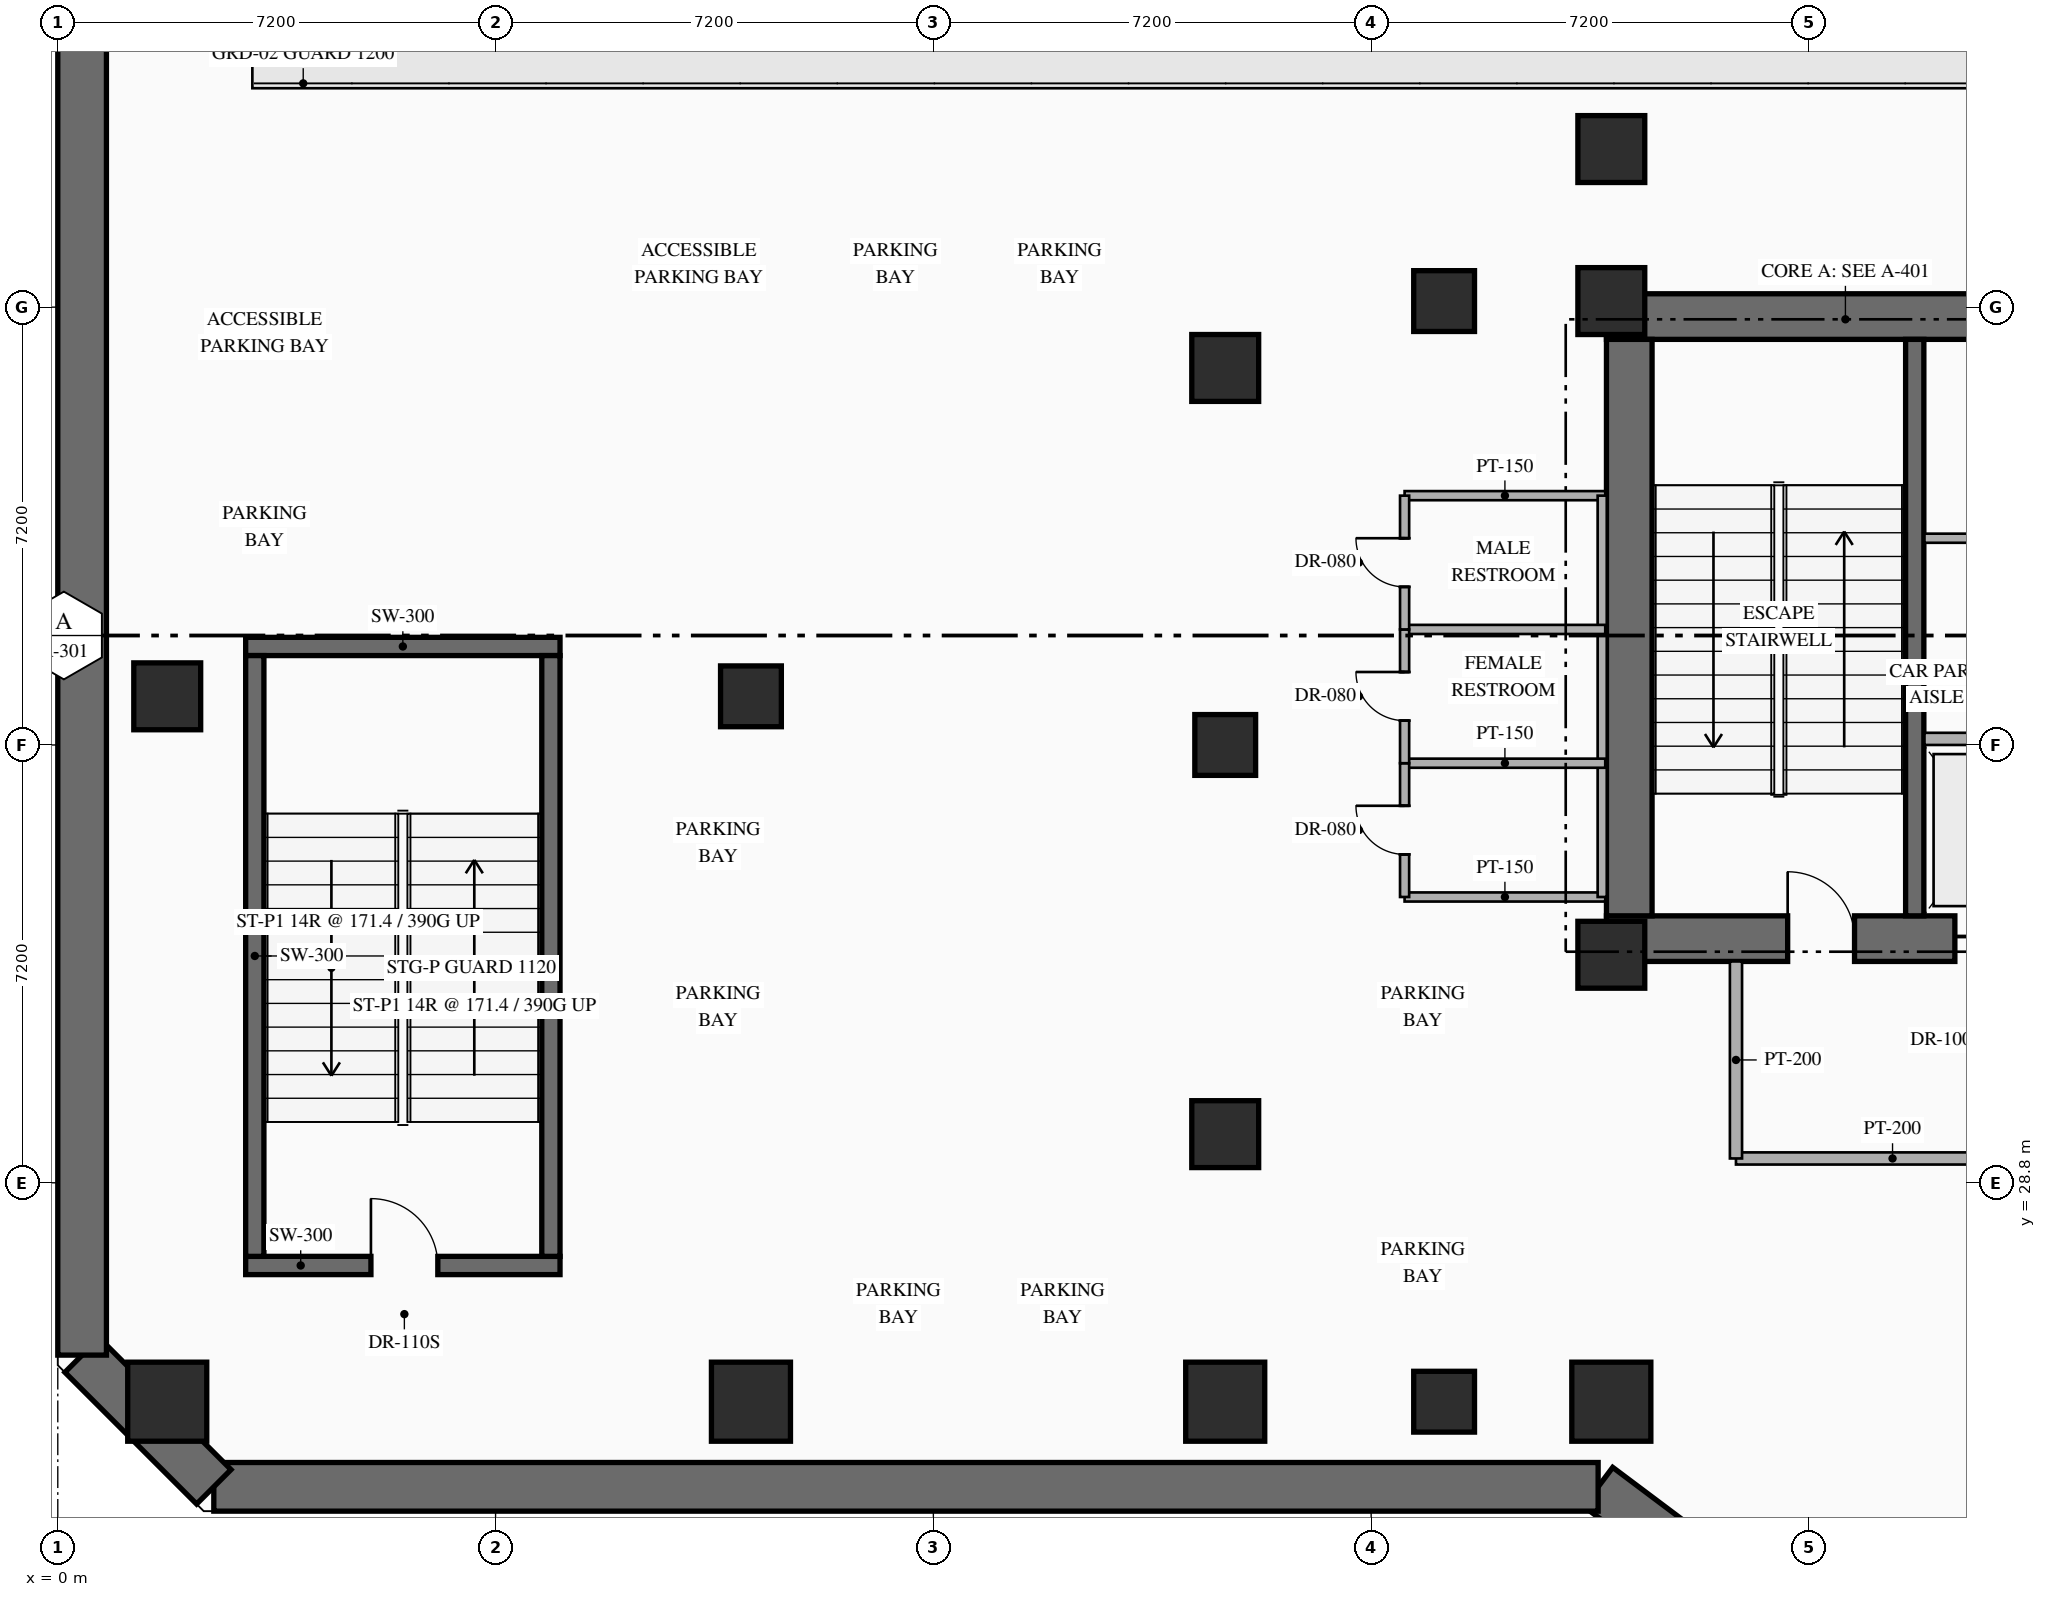
"""IFC4 building model, lengths in metres.
Left out: names, types, materials, properties, quantities, classifications, styles, units other than length and angle.
Written with IfcOpenShell. Run it as: python <this file> out.ifc"""

import sys

from ifc_helpers import new_model, si_unit, direction, frame, frame_2d, origin, origin_2d, place, context, subcontext, project, spatial, rectangle, hollow_rectangle, extrude, element, fill, save


model = new_model("IFC4")
c1 = context("Model", 3, precision=1e-05, world=origin(), true_north=direction((0.0, 1.0)))
c2 = subcontext(c1, "Body", "Model", "MODEL_VIEW")
j1 = project(units=[si_unit("LENGTHUNIT", "METRE"), si_unit("PLANEANGLEUNIT", "RADIAN")], contexts=[c1])
p1 = place(None, origin())
s1 = spatial("IfcSite", under=j1, at=p1, CompositionType="ELEMENT")
p2 = place(p1, origin())
s2 = spatial("IfcBuilding", under=s1, at=p2, CompositionType="ELEMENT")
p3 = place(p2, frame((0.0, 0.0, -9.6)))
s3 = spatial("IfcBuildingStorey", under=s2, at=p3, CompositionType="ELEMENT", Elevation=-9.6)
p4 = place(p3, frame((25.47, 32.815, 0.0), z_axis=(0.0, 0.0, 1.0), x_axis=(1.0, 0.0, 0.0)))
e1 = element("IfcWall", 1, at=p4, inside=s3, PredefinedType="SHEAR", context=c2, shape_type="SweptSolid", body=[
    extrude(rectangle(XDim=8.08, YDim=0.75, at=frame_2d((4.04, 0.0))), origin(), (0.0, 0.0, 1.0), 4.8),
])
p5 = place(p4, frame((2.98, 0.0, 0.0)))
e2 = element("IfcOpeningElement", 2, at=p5, cuts=e1, PredefinedType="OPENING", context=c2, shape_type="SweptSolid", body=[
    extrude(rectangle(XDim=1.1, YDim=2.2, at=frame_2d((0.55, 1.1))), frame((0.0, 0.385, 0.0), z_axis=(0.0, -1.0, 0.0), x_axis=(1.0, 0.0, 0.0)), (0.0, 0.0, 1.0), 0.77),
])
p6 = place(p4, frame((5.73, 0.0, 0.0)))
e3 = element("IfcOpeningElement", 3, at=p6, cuts=e1, PredefinedType="OPENING", context=c2, shape_type="SweptSolid", body=[
    extrude(rectangle(XDim=1.1, YDim=2.15, at=frame_2d((0.55, 1.075))), frame((0.0, 0.385, 0.0), z_axis=(0.0, -1.0, 0.0), x_axis=(1.0, 0.0, 0.0)), (0.0, 0.0, 1.0), 0.77),
])
p7 = place(p3, frame((25.47, 43.045, 0.0), z_axis=(0.0, 0.0, 1.0), x_axis=(1.0, 0.0, 0.0)))
e4 = element("IfcWall", 4, at=p7, inside=s3, PredefinedType="SHEAR", context=c2, shape_type="SweptSolid", body=[
    extrude(rectangle(XDim=8.08, YDim=0.75, at=frame_2d((4.04, 0.0))), origin(), (0.0, 0.0, 1.0), 4.8),
])
p8 = place(p3, frame((25.845, 33.19, 0.0), z_axis=(0.0, 0.0, 1.0), x_axis=(0.0, 1.0, 0.0)))
e5 = element("IfcWall", 5, at=p8, inside=s3, PredefinedType="SHEAR", context=c2, shape_type="SweptSolid", body=[
    extrude(rectangle(XDim=9.48, YDim=0.75, at=frame_2d((4.74, 0.0))), origin(), (0.0, 0.0, 1.0), 4.8),
])
p9 = place(p3, frame((30.54, 33.19, 0.0), z_axis=(0.0, 0.0, 1.0), x_axis=(0.0, 1.0, 0.0)))
e6 = element("IfcWall", 6, at=p9, inside=s3, PredefinedType="SHEAR", context=c2, shape_type="SweptSolid", body=[
    extrude(rectangle(XDim=9.48, YDim=0.3, at=frame_2d((4.74, 0.0))), origin(), (0.0, 0.0, 1.0), 4.8),
])
p10 = place(p3, frame((3.09, 27.44, 0.0), z_axis=(0.0, 0.0, 1.0), x_axis=(1.0, 0.0, 0.0)))
e7 = element("IfcWall", 7, at=p10, inside=s3, PredefinedType="SHEAR", context=c2, shape_type="SweptSolid", body=[
    extrude(rectangle(XDim=5.17, YDim=0.3, at=frame_2d((2.585, 0.0))), origin(), (0.0, 0.0, 1.0), 4.8),
])
p11 = place(p10, frame((2.06, 0.0, 0.0)))
e8 = element("IfcOpeningElement", 8, at=p11, cuts=e7, PredefinedType="OPENING", context=c2, shape_type="SweptSolid", body=[
    extrude(rectangle(XDim=1.1, YDim=2.2, at=frame_2d((0.55, 1.1))), frame((0.0, 0.16, 0.0), z_axis=(0.0, -1.0, 0.0), x_axis=(1.0, 0.0, 0.0)), (0.0, 0.0, 1.0), 0.32),
])
p12 = place(p3, frame((3.09, 37.62, 0.0), z_axis=(0.0, 0.0, 1.0), x_axis=(1.0, 0.0, 0.0)))
e9 = element("IfcWall", 9, at=p12, inside=s3, PredefinedType="SHEAR", context=c2, shape_type="SweptSolid", body=[
    extrude(rectangle(XDim=5.17, YDim=0.3, at=frame_2d((2.585, 0.0))), origin(), (0.0, 0.0, 1.0), 4.8),
])
for number, where, z_axis, x_axis in (
    (10, (3.24, 27.59, 0.0), (0.0, 0.0, 1.0), (0.0, 1.0, 0.0)),
    (11, (8.11, 27.59, 0.0), (0.0, 0.0, 1.0), (0.0, 1.0, 0.0)),
):
    element("IfcWall", number, at=place(p3, frame(where, z_axis=z_axis, x_axis=x_axis)), inside=s3, PredefinedType="SHEAR", context=c2, shape_type="SweptSolid", body=[
        extrude(rectangle(XDim=9.88, YDim=0.3, at=frame_2d((4.94, 0.0))), origin(), (0.0, 0.0, 1.0), 4.8),
    ])
p13 = place(p3, frame((29.512, 20.666, 0.0), z_axis=(0.0, 0.0, 1.0), x_axis=(-0.800016825418, 0.599977565455, 0.0)))
e12 = element("IfcWall", 12, at=p13, inside=s3, PredefinedType="SHEAR", context=c2, shape_type="SweptSolid", body=[
    extrude(rectangle(XDim=5.224, YDim=0.8, at=frame_2d((2.612, 0.0))), origin(), (0.0, 0.0, 1.0), 4.5),
])
p14 = place(p3, frame((25.333, 23.8, 0.0), z_axis=(0.0, 0.0, 1.0), x_axis=(-1.0, 0.0, 0.0)))
e13 = element("IfcWall", 13, at=p14, inside=s3, PredefinedType="SHEAR", context=c2, shape_type="SweptSolid", body=[
    extrude(rectangle(XDim=22.767, YDim=0.8, at=frame_2d((11.384, 0.0))), origin(), (0.0, 0.0, 1.0), 4.5),
])
p15 = place(p3, frame((2.566, 23.8, 0.0), z_axis=(0.0, 0.0, 1.0), x_axis=(-0.707106781187, 0.707106781187, 0.0)))
e14 = element("IfcWall", 14, at=p15, inside=s3, PredefinedType="SHEAR", context=c2, shape_type="SweptSolid", body=[
    extrude(rectangle(XDim=3.063, YDim=0.8, at=frame_2d((1.532, 0.0))), origin(), (0.0, 0.0, 1.0), 4.5),
])
p16 = place(p3, frame((0.4, 25.966, 0.0), z_axis=(0.0, 0.0, 1.0), x_axis=(0.0, 1.0, 0.0)))
e15 = element("IfcWall", 15, at=p16, inside=s3, PredefinedType="SHEAR", context=c2, shape_type="SweptSolid", body=[
    extrude(rectangle(XDim=23.068, YDim=0.8, at=frame_2d((11.534, 0.0))), origin(), (0.0, 0.0, 1.0), 4.5),
])
for number, where, z_axis, x_axis in (
    (16, (25.55, 32.55, 0.0), (0.0, 0.0, 1.0), (1.0, 0.0, 0.0)),
    (17, (25.55, 43.3, 0.0), (0.0, 0.0, 1.0), (1.0, 0.0, 0.0)),
):
    element("IfcColumn", number, at=place(p3, frame(where, z_axis=z_axis, x_axis=x_axis)), inside=s3, PredefinedType="COLUMN", context=c2, shape_type="SweptSolid", body=[
        extrude(rectangle(XDim=1.1, YDim=1.1, at=origin_2d()), origin(), (0.0, 0.0, 1.0), 4.8),
    ])
p17 = place(p3, frame((25.55, 25.2, 0.0), z_axis=(0.0, 0.0, 1.0), x_axis=(1.0, 0.0, 0.0)))
e18 = element("IfcColumn", 18, at=p17, inside=s3, PredefinedType="COLUMN", context=c2, shape_type="SweptSolid", body=[
    extrude(rectangle(XDim=1.3, YDim=1.3, at=origin_2d()), origin(), (0.0, 0.0, 1.0), 4.8),
])
p18 = place(p3, frame((25.55, 45.8, 0.0), z_axis=(0.0, 0.0, 1.0), x_axis=(1.0, 0.0, 0.0)))
e19 = element("IfcColumn", 19, at=p18, inside=s3, PredefinedType="COLUMN", context=c2, shape_type="SweptSolid", body=[
    extrude(hollow_rectangle(XDim=1.1, YDim=1.1, WallThickness=0.04, at=origin_2d()), origin(), (0.0, 0.0, 1.0), 4.8),
])
p19 = place(p3, frame((1.8, 25.2, 0.0), z_axis=(0.0, 0.0, 1.0), x_axis=(1.0, 0.0, 0.0)))
e20 = element("IfcColumn", 20, at=p19, inside=s3, PredefinedType="COLUMN", context=c2, shape_type="SweptSolid", body=[
    extrude(rectangle(XDim=1.3, YDim=1.3, at=origin_2d()), origin(), (0.0, 0.0, 1.0), 4.8),
])
p20 = place(p3, frame((1.8, 36.8, 0.0), z_axis=(0.0, 0.0, 1.0), x_axis=(1.0, 0.0, 0.0)))
e21 = element("IfcColumn", 21, at=p20, inside=s3, PredefinedType="COLUMN", context=c2, shape_type="SweptSolid", body=[
    extrude(hollow_rectangle(XDim=1.1, YDim=1.1, WallThickness=0.04, at=origin_2d()), origin(), (0.0, 0.0, 1.0), 4.8),
])
for number, where, z_axis, x_axis in (
    (22, (11.4, 25.2, 0.0), (0.0, 0.0, 1.0), (1.0, 0.0, 0.0)),
    (23, (19.2, 25.2, 0.0), (0.0, 0.0, 1.0), (1.0, 0.0, 0.0)),
):
    element("IfcColumn", number, at=place(p3, frame(where, z_axis=z_axis, x_axis=x_axis)), inside=s3, PredefinedType="COLUMN", context=c2, shape_type="SweptSolid", body=[
        extrude(rectangle(XDim=1.3, YDim=1.3, at=origin_2d()), origin(), (0.0, 0.0, 1.0), 4.8),
    ])
for number, where, z_axis, x_axis in (
    (24, (19.2, 29.6, 0.0), (0.0, 0.0, 1.0), (1.0, 0.0, 0.0)),
    (25, (19.2, 42.2, 0.0), (0.0, 0.0, 1.0), (1.0, 0.0, 0.0)),
):
    element("IfcColumn", number, at=place(p3, frame(where, z_axis=z_axis, x_axis=x_axis)), inside=s3, PredefinedType="COLUMN", context=c2, shape_type="SweptSolid", body=[
        extrude(hollow_rectangle(XDim=1.1, YDim=1.1, WallThickness=0.04, at=origin_2d()), origin(), (0.0, 0.0, 1.0), 4.8),
    ])
for number, where, z_axis, x_axis in (
    (26, (22.8, 25.2, 0.0), (0.0, 0.0, 1.0), (1.0, 0.0, 0.0)),
    (27, (22.8, 43.3, 0.0), (0.0, 0.0, 1.0), (1.0, 0.0, 0.0)),
    (28, (11.4, 36.8, 0.0), (0.0, 0.0, 1.0), (1.0, 0.0, 0.0)),
    (29, (19.2, 36.0, 0.0), (0.0, 0.0, 1.0), (1.0, 0.0, 0.0)),
):
    element("IfcColumn", number, at=place(p3, frame(where, z_axis=z_axis, x_axis=x_axis)), inside=s3, PredefinedType="COLUMN", context=c2, shape_type="SweptSolid", body=[
        extrude(hollow_rectangle(XDim=1.0, YDim=1.0, WallThickness=0.038, at=origin_2d()), origin(), (0.0, 0.0, 1.0), 4.8),
    ])
p21 = place(p3, frame((30.7, 36.1, 0.0), z_axis=(0.0, 0.0, 1.0), x_axis=(1.0, 0.0, 0.0)))
e30 = element("IfcWall", 30, at=p21, inside=s3, PredefinedType="STANDARD", context=c2, shape_type="SweptSolid", body=[
    extrude(rectangle(XDim=2.1, YDim=0.2, at=frame_2d((1.05, 0.0))), origin(), (0.0, 0.0, 1.0), 4.5),
])
p22 = place(p3, frame((30.7, 39.4, 0.0), z_axis=(0.0, 0.0, 1.0), x_axis=(1.0, 0.0, 0.0)))
e31 = element("IfcWall", 31, at=p22, inside=s3, PredefinedType="PARTITIONING", context=c2, shape_type="SweptSolid", body=[
    extrude(rectangle(XDim=2.1, YDim=0.15, at=frame_2d((1.05, 0.0))), origin(), (0.0, 0.0, 1.0), 4.5),
])
p23 = place(p3, frame((27.6, 29.2, 0.0), z_axis=(0.0, 0.0, 1.0), x_axis=(1.0, 0.0, 0.0)))
e32 = element("IfcWall", 32, at=p23, inside=s3, PredefinedType="STANDARD", context=c2, shape_type="SweptSolid", body=[
    extrude(rectangle(XDim=5.15, YDim=0.2, at=frame_2d((2.575, 0.0))), origin(), (0.0, 0.0, 1.0), 4.5),
])
p24 = place(p3, frame((27.6, 29.2, 0.0), z_axis=(0.0, 0.0, 1.0), x_axis=(0.0, 1.0, 0.0)))
e33 = element("IfcWall", 33, at=p24, inside=s3, PredefinedType="STANDARD", context=c2, shape_type="SweptSolid", body=[
    extrude(rectangle(XDim=3.24, YDim=0.2, at=frame_2d((1.62, 0.0))), origin(), (0.0, 0.0, 1.0), 4.5),
])
for number, where, z_axis, x_axis in (
    (34, (22.15, 33.5, 0.0), (0.0, 0.0, 1.0), (1.0, 0.0, 0.0)),
    (35, (22.15, 40.1, 0.0), (0.0, 0.0, 1.0), (1.0, 0.0, 0.0)),
):
    element("IfcWall", number, at=place(p3, frame(where, z_axis=z_axis, x_axis=x_axis)), inside=s3, PredefinedType="PARTITIONING", context=c2, shape_type="SweptSolid", body=[
        extrude(rectangle(XDim=3.3, YDim=0.15, at=frame_2d((1.65, 0.0))), origin(), (0.0, 0.0, 1.0), 4.5),
    ])
p25 = place(p3, frame((25.4, 33.5, 0.0), z_axis=(0.0, 0.0, 1.0), x_axis=(0.0, 1.0, 0.0)))
e36 = element("IfcWall", 36, at=p25, inside=s3, PredefinedType="PARTITIONING", context=c2, shape_type="SweptSolid", body=[
    extrude(rectangle(XDim=6.6, YDim=0.15, at=frame_2d((3.3, 0.0))), origin(), (0.0, 0.0, 1.0), 4.5),
])
for number, where, z_axis, x_axis in (
    (37, (22.15, 35.7, 0.0), (0.0, 0.0, 1.0), (1.0, 0.0, 0.0)),
    (38, (22.15, 37.9, 0.0), (0.0, 0.0, 1.0), (1.0, 0.0, 0.0)),
):
    element("IfcWall", number, at=place(p3, frame(where, z_axis=z_axis, x_axis=x_axis)), inside=s3, PredefinedType="PARTITIONING", context=c2, shape_type="SweptSolid", body=[
        extrude(rectangle(XDim=3.3, YDim=0.15, at=frame_2d((1.65, 0.0))), origin(), (0.0, 0.0, 1.0), 4.5),
    ])
p26 = place(p3, frame((22.15, 33.5, 0.0), z_axis=(0.0, 0.0, 1.0), x_axis=(0.0, 1.0, 0.0)))
e39 = element("IfcWall", 39, at=p26, inside=s3, PredefinedType="PARTITIONING", context=c2, shape_type="SweptSolid", body=[
    extrude(rectangle(XDim=2.2, YDim=0.15, at=frame_2d((1.1, 0.0))), origin(), (0.0, 0.0, 1.0), 4.5),
])
p27 = place(p26, frame((0.7, 0.0, 0.0)))
e40 = element("IfcOpeningElement", 40, at=p27, cuts=e39, PredefinedType="OPENING", context=c2, shape_type="SweptSolid", body=[
    extrude(rectangle(XDim=0.8, YDim=2.06, at=frame_2d((0.4, 1.03))), frame((0.0, 0.085, 0.0), z_axis=(0.0, -1.0, 0.0), x_axis=(1.0, 0.0, 0.0)), (0.0, 0.0, 1.0), 0.17),
])
p28 = place(p3, frame((22.15, 35.7, 0.0), z_axis=(0.0, 0.0, 1.0), x_axis=(0.0, 1.0, 0.0)))
e41 = element("IfcWall", 41, at=p28, inside=s3, PredefinedType="PARTITIONING", context=c2, shape_type="SweptSolid", body=[
    extrude(rectangle(XDim=2.2, YDim=0.15, at=frame_2d((1.1, 0.0))), origin(), (0.0, 0.0, 1.0), 4.5),
])
p29 = place(p28, frame((0.7, 0.0, 0.0)))
e42 = element("IfcOpeningElement", 42, at=p29, cuts=e41, PredefinedType="OPENING", context=c2, shape_type="SweptSolid", body=[
    extrude(rectangle(XDim=0.8, YDim=2.06, at=frame_2d((0.4, 1.03))), frame((0.0, 0.085, 0.0), z_axis=(0.0, -1.0, 0.0), x_axis=(1.0, 0.0, 0.0)), (0.0, 0.0, 1.0), 0.17),
])
p30 = place(p3, frame((22.15, 37.9, 0.0), z_axis=(0.0, 0.0, 1.0), x_axis=(0.0, 1.0, 0.0)))
e43 = element("IfcWall", 43, at=p30, inside=s3, PredefinedType="PARTITIONING", context=c2, shape_type="SweptSolid", body=[
    extrude(rectangle(XDim=2.2, YDim=0.15, at=frame_2d((1.1, 0.0))), origin(), (0.0, 0.0, 1.0), 4.5),
])
p31 = place(p30, frame((0.7, 0.0, 0.0)))
e44 = element("IfcOpeningElement", 44, at=p31, cuts=e43, PredefinedType="OPENING", context=c2, shape_type="SweptSolid", body=[
    extrude(rectangle(XDim=0.8, YDim=2.06, at=frame_2d((0.4, 1.03))), frame((0.0, 0.085, 0.0), z_axis=(0.0, -1.0, 0.0), x_axis=(1.0, 0.0, 0.0)), (0.0, 0.0, 1.0), 0.17),
])
p32 = place(p5, origin())
e45 = element("IfcDoor", 45, at=p32, inside=s3, OperationType="SINGLE_SWING_LEFT", PredefinedType="DOOR", context=c2, shape_type="SweptSolid", body=[
    extrude(rectangle(XDim=1.1, YDim=2.2, at=frame_2d((0.55, 1.1))), frame((0.0, 0.025, 0.0), z_axis=(0.0, -1.0, 0.0), x_axis=(1.0, 0.0, 0.0)), (0.0, 0.0, 1.0), 0.05),
])
fill(e2, e45)
p33 = place(p6, origin())
e46 = element("IfcDoor", 46, at=p33, inside=s3, OperationType="SLIDING_TO_LEFT", PredefinedType="USERDEFINED", context=c2, shape_type="SweptSolid", body=[
    extrude(rectangle(XDim=1.1, YDim=2.15, at=frame_2d((0.55, 1.075))), frame((0.0, 0.025, 0.0), z_axis=(0.0, -1.0, 0.0), x_axis=(1.0, 0.0, 0.0)), (0.0, 0.0, 1.0), 0.05),
])
fill(e3, e46)
p34 = place(p11, origin())
e47 = element("IfcDoor", 47, at=p34, inside=s3, OperationType="SINGLE_SWING_LEFT", PredefinedType="DOOR", context=c2, shape_type="SweptSolid", body=[
    extrude(rectangle(XDim=1.1, YDim=2.2, at=frame_2d((0.55, 1.1))), frame((0.0, 0.025, 0.0), z_axis=(0.0, -1.0, 0.0), x_axis=(1.0, 0.0, 0.0)), (0.0, 0.0, 1.0), 0.05),
])
fill(e8, e47)
p35 = place(p27, origin())
e48 = element("IfcDoor", 48, at=p35, inside=s3, OperationType="SINGLE_SWING_RIGHT", PredefinedType="DOOR", context=c2, shape_type="SweptSolid", body=[
    extrude(rectangle(XDim=0.8, YDim=2.06, at=frame_2d((0.4, 1.03))), frame((0.0, 0.025, 0.0), z_axis=(0.0, -1.0, 0.0), x_axis=(1.0, 0.0, 0.0)), (0.0, 0.0, 1.0), 0.05),
])
fill(e40, e48)
p36 = place(p29, origin())
e49 = element("IfcDoor", 49, at=p36, inside=s3, OperationType="SINGLE_SWING_RIGHT", PredefinedType="DOOR", context=c2, shape_type="SweptSolid", body=[
    extrude(rectangle(XDim=0.8, YDim=2.06, at=frame_2d((0.4, 1.03))), frame((0.0, 0.025, 0.0), z_axis=(0.0, -1.0, 0.0), x_axis=(1.0, 0.0, 0.0)), (0.0, 0.0, 1.0), 0.05),
])
fill(e42, e49)
p37 = place(p31, origin())
e50 = element("IfcDoor", 50, at=p37, inside=s3, OperationType="SINGLE_SWING_RIGHT", PredefinedType="DOOR", context=c2, shape_type="SweptSolid", body=[
    extrude(rectangle(XDim=0.8, YDim=2.06, at=frame_2d((0.4, 1.03))), frame((0.0, 0.025, 0.0), z_axis=(0.0, -1.0, 0.0), x_axis=(1.0, 0.0, 0.0)), (0.0, 0.0, 1.0), 0.05),
])
fill(e44, e50)
save(model, sys.argv[1])
